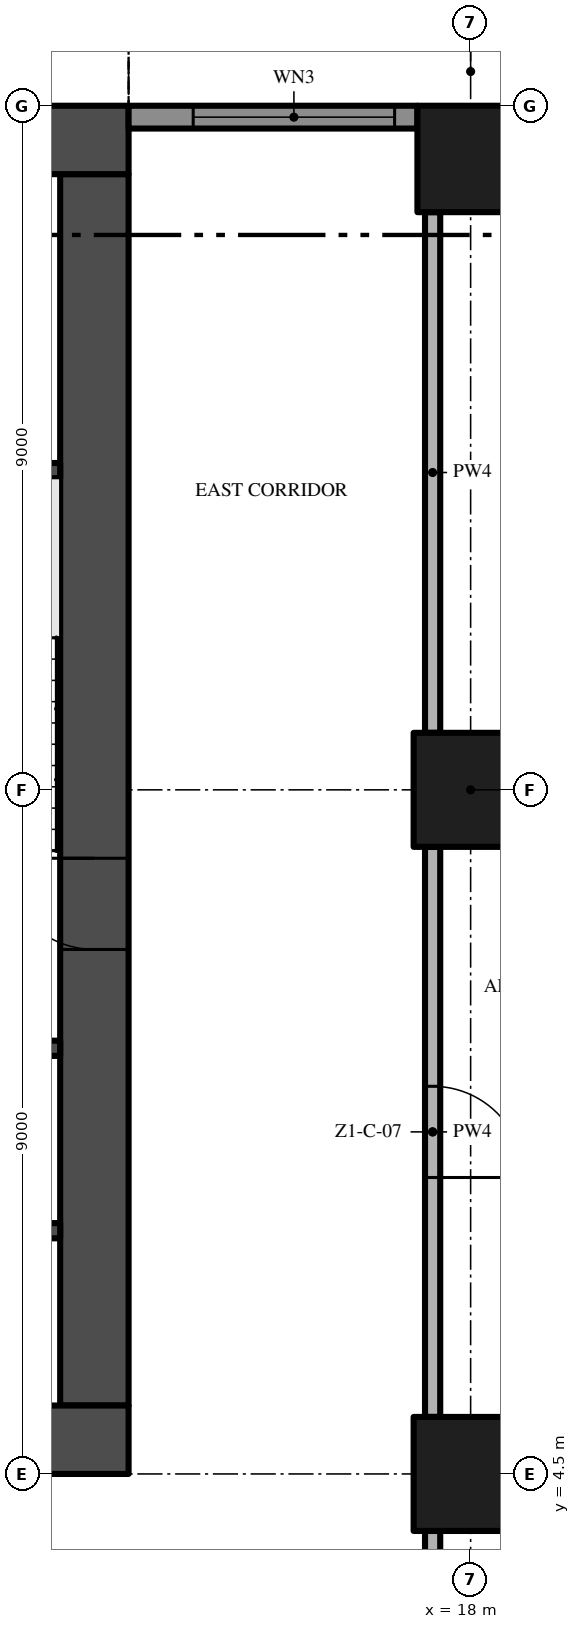
"""IFC4 building model, lengths in metres.
Left out: names, types, materials, properties, quantities, classifications, styles, units other than length and angle.
Written with IfcOpenShell. Run it as: python <this file> out.ifc"""

import sys

from ifc_helpers import new_model, si_unit, direction, frame, frame_2d, origin, origin_2d, place, context, subcontext, project, spatial, rectangle, extrude, element, fill, save


model = new_model("IFC4")
c1 = context("Model", 3, precision=1e-05, world=origin(), true_north=direction((0.0, 1.0)))
c2 = subcontext(c1, "Body", "Model", "MODEL_VIEW")
j1 = project(units=[si_unit("LENGTHUNIT", "METRE"), si_unit("PLANEANGLEUNIT", "RADIAN")], contexts=[c1])
p1 = place(None, origin())
s1 = spatial("IfcSite", under=j1, at=p1, CompositionType="ELEMENT")
p2 = place(p1, origin())
s2 = spatial("IfcBuilding", under=s1, at=p2, CompositionType="ELEMENT")
p3 = place(p2, frame((0.0, 0.0, 45.4)))
s3 = spatial("IfcBuildingStorey", under=s2, at=p3, CompositionType="ELEMENT", Elevation=45.4)
p4 = place(p3, frame((-13.5, 4.95, -0.3), z_axis=(0.0, 0.0, 1.0), x_axis=(1.0, 0.0, 0.0)))
e1 = element("IfcWall", 1, at=p4, inside=s3, PredefinedType="SHEAR", context=c2, shape_type="SweptSolid", body=[
    extrude(rectangle(XDim=27.0, YDim=0.9, at=frame_2d((13.5, 0.0))), origin(), (0.0, 0.0, 1.0), 3.8),
])
p5 = place(p4, frame((12.0, 0.0, 0.3)))
e2 = element("IfcOpeningElement", 2, at=p5, cuts=e1, PredefinedType="OPENING", context=c2, shape_type="SweptSolid", body=[
    extrude(rectangle(XDim=3.0, YDim=2.4, at=frame_2d((1.5, 1.2))), frame((0.0, 0.46, 0.0), z_axis=(0.0, -1.0, 0.0), x_axis=(1.0, 0.0, 0.0)), (0.0, 0.0, 1.0), 0.92),
])
p6 = place(p4, frame((4.9, 0.0, 0.3)))
e3 = element("IfcOpeningElement", 3, at=p6, cuts=e1, PredefinedType="OPENING", context=c2, shape_type="SweptSolid", body=[
    extrude(rectangle(XDim=1.2, YDim=2.2, at=frame_2d((0.6, 1.1))), frame((0.0, 0.46, 0.0), z_axis=(0.0, -1.0, 0.0), x_axis=(1.0, 0.0, 0.0)), (0.0, 0.0, 1.0), 0.92),
])
p7 = place(p4, frame((20.75, 0.0, 0.3)))
e4 = element("IfcOpeningElement", 4, at=p7, cuts=e1, PredefinedType="OPENING", context=c2, shape_type="SweptSolid", body=[
    extrude(rectangle(XDim=1.5, YDim=2.2, at=frame_2d((0.75, 1.1))), frame((0.0, 0.46, 0.0), z_axis=(0.0, -1.0, 0.0), x_axis=(1.0, 0.0, 0.0)), (0.0, 0.0, 1.0), 0.92),
])
p8 = place(p4, frame((17.4, 0.0, 0.3)))
e5 = element("IfcOpeningElement", 5, at=p8, cuts=e1, PredefinedType="OPENING", context=c2, shape_type="SweptSolid", body=[
    extrude(rectangle(XDim=1.2, YDim=2.2, at=frame_2d((0.6, 1.1))), frame((0.0, 0.46, 0.0), z_axis=(0.0, -1.0, 0.0), x_axis=(1.0, 0.0, 0.0)), (0.0, 0.0, 1.0), 0.92),
])
p9 = place(p3, frame((13.05, 5.4, -0.3), z_axis=(0.0, 0.0, 1.0), x_axis=(0.0, 1.0, 0.0)))
e6 = element("IfcWall", 6, at=p9, inside=s3, PredefinedType="SHEAR", context=c2, shape_type="SweptSolid", body=[
    extrude(rectangle(XDim=16.2, YDim=0.9, at=frame_2d((8.1, 0.0))), origin(), (0.0, 0.0, 1.0), 3.8),
])
p10 = place(p9, frame((6.0, 0.0, 0.3)))
e7 = element("IfcOpeningElement", 7, at=p10, cuts=e6, PredefinedType="OPENING", context=c2, shape_type="SweptSolid", body=[
    extrude(rectangle(XDim=1.2, YDim=2.2, at=frame_2d((0.6, 1.1))), frame((0.0, 0.46, 0.0), z_axis=(0.0, -1.0, 0.0), x_axis=(1.0, 0.0, 0.0)), (0.0, 0.0, 1.0), 0.92),
])
p11 = place(p3, frame((13.5, 22.05, -0.3), z_axis=(0.0, 0.0, 1.0), x_axis=(-1.0, 0.0, 0.0)))
e8 = element("IfcWall", 8, at=p11, inside=s3, PredefinedType="SHEAR", context=c2, shape_type="SweptSolid", body=[
    extrude(rectangle(XDim=27.0, YDim=0.9, at=frame_2d((13.5, 0.0))), origin(), (0.0, 0.0, 1.0), 3.8),
])
p12 = place(p3, frame((18.0, 13.5, 0.0), z_axis=(0.0, 0.0, 1.0), x_axis=(1.0, 0.0, 0.0)))
e9 = element("IfcColumn", 9, at=p12, inside=s3, PredefinedType="COLUMN", context=c2, shape_type="SweptSolid", body=[
    extrude(rectangle(XDim=1.5, YDim=1.5, at=origin_2d()), origin(), (0.0, 0.0, 1.0), 3.5),
])
p13 = place(p3, frame((18.0, 21.8, 0.0), z_axis=(0.0, 0.0, 1.0), x_axis=(1.0, 0.0, 0.0)))
e10 = element("IfcColumn", 10, at=p13, inside=s3, PredefinedType="COLUMN", context=c2, shape_type="SweptSolid", body=[
    extrude(rectangle(XDim=1.4, YDim=1.4, at=origin_2d()), origin(), (0.0, 0.0, 1.0), 3.5),
])
p14 = place(p3, frame((18.0, 4.5, 0.0), z_axis=(0.0, 0.0, 1.0), x_axis=(1.0, 0.0, 0.0)))
e11 = element("IfcColumn", 11, at=p14, inside=s3, PredefinedType="COLUMN", context=c2, shape_type="SweptSolid", body=[
    extrude(rectangle(XDim=1.5, YDim=1.5, at=origin_2d()), origin(), (0.0, 0.0, 1.0), 3.5),
])
p15 = place(p3, frame((13.5, 22.35, 0.0), z_axis=(0.0, 0.0, 1.0), x_axis=(1.0, 0.0, 0.0)))
e12 = element("IfcWall", 12, at=p15, inside=s3, PredefinedType="SOLIDWALL", context=c2, shape_type="SweptSolid", body=[
    extrude(rectangle(XDim=3.8, YDim=0.3, at=frame_2d((1.9, 0.0))), origin(), (0.0, 0.0, 1.0), 3.5),
])
p16 = place(p15, frame((0.85, 0.0, 0.45)))
e13 = element("IfcOpeningElement", 13, at=p16, cuts=e12, PredefinedType="OPENING", context=c2, shape_type="SweptSolid", body=[
    extrude(rectangle(XDim=2.65, YDim=2.65, at=frame_2d((1.325, 1.325))), frame((0.0, 0.16, 0.0), z_axis=(0.0, -1.0, 0.0), x_axis=(1.0, 0.0, 0.0)), (0.0, 0.0, 1.0), 0.32),
])
for number, where, z_axis, x_axis in (
    (14, (9.65, 7.7, 0.0), (0.0, 0.0, 1.0), (1.0, 0.0, 0.0)),
    (15, (9.65, 10.1, 0.0), (0.0, 0.0, 1.0), (1.0, 0.0, 0.0)),
    (16, (9.65, 17.7, 0.0), (0.0, 0.0, 1.0), (1.0, 0.0, 0.0)),
):
    element("IfcWall", number, at=place(p3, frame(where, z_axis=z_axis, x_axis=x_axis)), inside=s3, PredefinedType="SHEAR", context=c2, shape_type="SweptSolid", body=[
        extrude(rectangle(XDim=2.95, YDim=0.2, at=frame_2d((1.475, 0.0))), origin(), (0.0, 0.0, 1.0), 3.5),
    ])
p17 = place(p3, frame((17.5, -0.2, 0.0), z_axis=(0.0, 0.0, 1.0), x_axis=(0.0, 1.0, 0.0)))
e17 = element("IfcWall", 17, at=p17, inside=s3, PredefinedType="PARTITIONING", context=c2, shape_type="SweptSolid", body=[
    extrude(rectangle(XDim=3.95, YDim=0.2, at=frame_2d((1.975, 0.0))), origin(), (0.0, 0.0, 1.0), 3.5),
])
p18 = place(p3, frame((17.5, 12.75, 0.0), z_axis=(0.0, 0.0, 1.0), x_axis=(0.0, -1.0, 0.0)))
e18 = element("IfcWall", 18, at=p18, inside=s3, PredefinedType="PARTITIONING", context=c2, shape_type="SweptSolid", body=[
    extrude(rectangle(XDim=7.5, YDim=0.2, at=frame_2d((3.75, 0.0))), origin(), (0.0, 0.0, 1.0), 3.5),
])
p19 = place(p18, frame((3.15, 0.0, 0.0)))
e19 = element("IfcOpeningElement", 19, at=p19, cuts=e18, PredefinedType="OPENING", context=c2, shape_type="SweptSolid", body=[
    extrude(rectangle(XDim=1.2, YDim=2.4, at=frame_2d((0.6, 1.2))), frame((0.0, 0.11, 0.0), z_axis=(0.0, -1.0, 0.0), x_axis=(1.0, 0.0, 0.0)), (0.0, 0.0, 1.0), 0.22),
])
p20 = place(p3, frame((17.5, 14.25, 0.0), z_axis=(0.0, 0.0, 1.0), x_axis=(0.0, 1.0, 0.0)))
e20 = element("IfcWall", 20, at=p20, inside=s3, PredefinedType="PARTITIONING", context=c2, shape_type="SweptSolid", body=[
    extrude(rectangle(XDim=6.85, YDim=0.2, at=frame_2d((3.425, 0.0))), origin(), (0.0, 0.0, 1.0), 3.5),
])
p21 = place(p16, origin())
e21 = element("IfcWindow", 21, at=p21, inside=s3, PartitioningType="SINGLE_PANEL", PredefinedType="WINDOW", context=c2, shape_type="SweptSolid", body=[
    extrude(rectangle(XDim=2.65, YDim=2.65, at=frame_2d((1.325, 1.325))), frame((0.0, 0.03, 0.0), z_axis=(0.0, -1.0, 0.0), x_axis=(1.0, 0.0, 0.0)), (0.0, 0.0, 1.0), 0.06),
])
fill(e13, e21)
p22 = place(p10, frame((1.2, 0.0, 0.0), z_axis=(0.0, 0.0, 1.0), x_axis=(-1.0, 0.0, 0.0)))
e22 = element("IfcDoor", 22, at=p22, inside=s3, OperationType="SINGLE_SWING_LEFT", PredefinedType="DOOR", context=c2, shape_type="SweptSolid", body=[
    extrude(rectangle(XDim=1.2, YDim=2.2, at=frame_2d((0.6, 1.1))), frame((0.0, 0.025, 0.0), z_axis=(0.0, -1.0, 0.0), x_axis=(1.0, 0.0, 0.0)), (0.0, 0.0, 1.0), 0.05),
])
fill(e7, e22)
p23 = place(p19, origin())
e23 = element("IfcDoor", 23, at=p23, inside=s3, OperationType="SINGLE_SWING_RIGHT", PredefinedType="DOOR", context=c2, shape_type="SweptSolid", body=[
    extrude(rectangle(XDim=1.2, YDim=2.4, at=frame_2d((0.6, 1.2))), frame((0.0, 0.025, 0.0), z_axis=(0.0, -1.0, 0.0), x_axis=(1.0, 0.0, 0.0)), (0.0, 0.0, 1.0), 0.05),
])
fill(e19, e23)
save(model, sys.argv[1])
